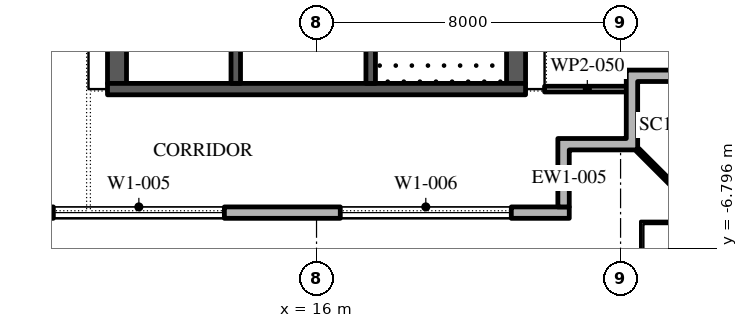
"""IFC4 building model, lengths in metres.
Left out: names, types, materials, properties, quantities, classifications, styles, units other than length and angle.
Written with IfcOpenShell. Run it as: python <this file> out.ifc"""

import sys

from ifc_helpers import new_model, si_unit, direction, frame, frame_2d, origin, place, context, subcontext, project, spatial, polyline, rectangle, outline, extrude, element, fill, save


model = new_model("IFC4")
c1 = context("Model", 3, precision=1e-05, world=origin(), true_north=direction((0.0, 1.0)))
c2 = subcontext(c1, "Body", "Model", "MODEL_VIEW")
j1 = project(units=[si_unit("LENGTHUNIT", "METRE"), si_unit("PLANEANGLEUNIT", "RADIAN")], contexts=[c1])
p1 = place(None, origin())
s1 = spatial("IfcSite", under=j1, at=p1, CompositionType="ELEMENT")
p2 = place(p1, origin())
s2 = spatial("IfcBuilding", under=s1, at=p2, CompositionType="ELEMENT")
p3 = place(p2, frame((0.0, 0.0, 334.2)))
s3 = spatial("IfcBuildingStorey", under=s2, at=p3, CompositionType="ELEMENT", Elevation=334.2)
p4 = place(p3, frame((-22.35, -5.85, 0.0), z_axis=(0.0, 0.0, 1.0), x_axis=(1.0, 0.0, 0.0)))
e1 = element("IfcWall", 1, at=p4, inside=s3, PredefinedType="STANDARD", context=c2, shape_type="SweptSolid", body=[
    extrude(rectangle(XDim=45.0, YDim=0.3, at=frame_2d((22.5, 0.0))), origin(), (0.0, 0.0, 1.0), 4.0),
])
p5 = place(p4, frame((1.375, 0.0, 0.45)))
e2 = element("IfcOpeningElement", 2, at=p5, cuts=e1, PredefinedType="OPENING", context=c2, shape_type="SweptSolid", body=[
    extrude(rectangle(XDim=4.5, YDim=3.05, at=frame_2d((2.25, 1.525))), frame((0.0, 0.16, 0.0), z_axis=(0.0, -1.0, 0.0), x_axis=(1.0, 0.0, 0.0)), (0.0, 0.0, 1.0), 0.32),
])
p6 = place(p4, frame((8.775, 0.0, 0.45)))
e3 = element("IfcOpeningElement", 3, at=p6, cuts=e1, PredefinedType="OPENING", context=c2, shape_type="SweptSolid", body=[
    extrude(rectangle(XDim=4.5, YDim=3.05, at=frame_2d((2.25, 1.525))), frame((0.0, 0.16, 0.0), z_axis=(0.0, -1.0, 0.0), x_axis=(1.0, 0.0, 0.0)), (0.0, 0.0, 1.0), 0.32),
])
p7 = place(p4, frame((17.375, 0.0, 0.0)))
e4 = element("IfcOpeningElement", 4, at=p7, cuts=e1, PredefinedType="OPENING", context=c2, shape_type="SweptSolid", body=[
    extrude(rectangle(XDim=2.4, YDim=3.5, at=frame_2d((1.2, 1.75))), frame((0.0, 0.16, 0.0), z_axis=(0.0, -1.0, 0.0), x_axis=(1.0, 0.0, 0.0)), (0.0, 0.0, 1.0), 0.32),
])
p8 = place(p4, frame((23.875, 0.0, 0.45)))
e5 = element("IfcOpeningElement", 5, at=p8, cuts=e1, PredefinedType="OPENING", context=c2, shape_type="SweptSolid", body=[
    extrude(rectangle(XDim=4.5, YDim=3.05, at=frame_2d((2.25, 1.525))), frame((0.0, 0.16, 0.0), z_axis=(0.0, -1.0, 0.0), x_axis=(1.0, 0.0, 0.0)), (0.0, 0.0, 1.0), 0.32),
])
p9 = place(p4, frame((31.425, 0.0, 0.45)))
e6 = element("IfcOpeningElement", 6, at=p9, cuts=e1, PredefinedType="OPENING", context=c2, shape_type="SweptSolid", body=[
    extrude(rectangle(XDim=4.5, YDim=3.05, at=frame_2d((2.25, 1.525))), frame((0.0, 0.16, 0.0), z_axis=(0.0, -1.0, 0.0), x_axis=(1.0, 0.0, 0.0)), (0.0, 0.0, 1.0), 0.32),
])
p10 = place(p4, frame((38.975, 0.0, 0.45)))
e7 = element("IfcOpeningElement", 7, at=p10, cuts=e1, PredefinedType="OPENING", context=c2, shape_type="SweptSolid", body=[
    extrude(rectangle(XDim=4.5, YDim=3.05, at=frame_2d((2.25, 1.525))), frame((0.0, 0.16, 0.0), z_axis=(0.0, -1.0, 0.0), x_axis=(1.0, 0.0, 0.0)), (0.0, 0.0, 1.0), 0.32),
])
p11 = place(p3, origin())
e8 = element("IfcWall", 8, at=p11, inside=s3, PredefinedType="STANDARD", context=c2, shape_type="SweptSolid", body=[
    extrude(outline(polyline([(24.15, -3.9), (24.15, -2.1), (26.25, -2.1), (26.25, -2.4), (24.45, -2.4), (24.45, -4.2), (22.65, -4.2), (22.65, -5.7), (22.35, -5.7), (22.35, -3.9), (24.15, -3.9)])), origin(), (0.0, 0.0, 1.0), 4.0),
])
p12 = place(p3, frame((24.45, -4.2, -0.05), z_axis=(0.0, 0.0, 1.0), x_axis=(0.707106781187, -0.707106781187, 0.0)))
e9 = element("IfcWall", 9, at=p12, inside=s3, PredefinedType="STANDARD", context=c2, shape_type="SweptSolid", body=[
    extrude(rectangle(XDim=2.667, YDim=0.1, at=frame_2d((1.333, 0.0))), origin(), (0.0, 0.0, 1.0), 4.05),
])
p13 = place(p3, frame((21.25, -2.45, 0.0), z_axis=(0.0, 0.0, 1.0), x_axis=(0.0, 1.0, 0.0)))
e10 = element("IfcWall", 10, at=p13, inside=s3, PredefinedType="SHEAR", context=c2, shape_type="SweptSolid", body=[
    extrude(rectangle(XDim=27.9, YDim=0.5, at=frame_2d((13.95, 0.0))), origin(), (0.0, 0.0, 1.0), 4.0),
])
p14 = place(p13, frame((5.05, 0.0, 0.0)))
e11 = element("IfcOpeningElement", 11, at=p14, cuts=e10, PredefinedType="OPENING", context=c2, shape_type="SweptSolid", body=[
    extrude(rectangle(XDim=1.2, YDim=2.1, at=frame_2d((0.6, 1.05))), frame((0.0, 0.26, 0.0), z_axis=(0.0, -1.0, 0.0), x_axis=(1.0, 0.0, 0.0)), (0.0, 0.0, 1.0), 0.52),
])
p15 = place(p13, frame((21.65, 0.0, 0.0)))
e12 = element("IfcOpeningElement", 12, at=p15, cuts=e10, PredefinedType="OPENING", context=c2, shape_type="SweptSolid", body=[
    extrude(rectangle(XDim=1.2, YDim=2.1, at=frame_2d((0.6, 1.05))), frame((0.0, 0.26, 0.0), z_axis=(0.0, -1.0, 0.0), x_axis=(1.0, 0.0, 0.0)), (0.0, 0.0, 1.0), 0.52),
])
p16 = place(p3, frame((10.75, -2.45, 0.0), z_axis=(0.0, 0.0, 1.0), x_axis=(0.0, 1.0, 0.0)))
e13 = element("IfcWall", 13, at=p16, inside=s3, PredefinedType="SHEAR", context=c2, shape_type="SweptSolid", body=[
    extrude(rectangle(XDim=27.9, YDim=0.5, at=frame_2d((13.95, 0.0))), origin(), (0.0, 0.0, 1.0), 4.0),
])
p17 = place(p16, frame((23.65, 0.0, 0.0)))
e14 = element("IfcOpeningElement", 14, at=p17, cuts=e13, PredefinedType="OPENING", context=c2, shape_type="SweptSolid", body=[
    extrude(rectangle(XDim=2.4, YDim=2.1, at=frame_2d((1.2, 1.05))), frame((0.0, 0.26, 0.0), z_axis=(0.0, -1.0, 0.0), x_axis=(1.0, 0.0, 0.0)), (0.0, 0.0, 1.0), 0.52),
])
p18 = place(p16, frame((1.387, 0.0, 0.0)))
e15 = element("IfcOpeningElement", 15, at=p18, cuts=e13, PredefinedType="OPENING", context=c2, shape_type="SweptSolid", body=[
    extrude(rectangle(XDim=0.9, YDim=2.1, at=frame_2d((0.45, 1.05))), frame((0.0, 0.26, 0.0), z_axis=(0.0, -1.0, 0.0), x_axis=(1.0, 0.0, 0.0)), (0.0, 0.0, 1.0), 0.52),
])
p19 = place(p16, frame((4.562, 0.0, 0.0)))
e16 = element("IfcOpeningElement", 16, at=p19, cuts=e13, PredefinedType="OPENING", context=c2, shape_type="SweptSolid", body=[
    extrude(rectangle(XDim=1.0, YDim=2.1, at=frame_2d((0.5, 1.05))), frame((0.0, 0.26, 0.0), z_axis=(0.0, -1.0, 0.0), x_axis=(1.0, 0.0, 0.0)), (0.0, 0.0, 1.0), 0.52),
])
p20 = place(p3, frame((10.5, -2.6, 0.0), z_axis=(0.0, 0.0, 1.0), x_axis=(1.0, 0.0, 0.0)))
e17 = element("IfcWall", 17, at=p20, inside=s3, PredefinedType="SHEAR", context=c2, shape_type="SweptSolid", body=[
    extrude(rectangle(XDim=11.0, YDim=0.3, at=frame_2d((5.5, 0.0))), origin(), (0.0, 0.0, 1.0), 4.0),
])
p21 = place(p3, frame((17.425, -2.45, 0.0), z_axis=(0.0, 0.0, 1.0), x_axis=(0.0, 1.0, 0.0)))
e18 = element("IfcWall", 18, at=p21, inside=s3, PredefinedType="SHEAR", context=c2, shape_type="SweptSolid", body=[
    extrude(rectangle(XDim=6.3, YDim=0.25, at=frame_2d((3.15, 0.0))), origin(), (0.0, 0.0, 1.0), 4.0),
])
p22 = place(p21, frame((5.05, 0.0, 0.0)))
e19 = element("IfcOpeningElement", 19, at=p22, cuts=e18, PredefinedType="OPENING", context=c2, shape_type="SweptSolid", body=[
    extrude(rectangle(XDim=1.2, YDim=2.1, at=frame_2d((0.6, 1.05))), frame((0.0, 0.135, 0.0), z_axis=(0.0, -1.0, 0.0), x_axis=(1.0, 0.0, 0.0)), (0.0, 0.0, 1.0), 0.27),
])
p23 = place(p3, frame((13.875, -2.45, 0.0), z_axis=(0.0, 0.0, 1.0), x_axis=(0.0, 1.0, 0.0)))
e20 = element("IfcWall", 20, at=p23, inside=s3, PredefinedType="SHEAR", context=c2, shape_type="SweptSolid", body=[
    extrude(rectangle(XDim=21.3, YDim=0.25, at=frame_2d((10.65, 0.0))), origin(), (0.0, 0.0, 1.0), 4.0),
])
p24 = place(p23, frame((9.846, 0.0, 0.0)))
e21 = element("IfcOpeningElement", 21, at=p24, cuts=e20, PredefinedType="OPENING", context=c2, shape_type="SweptSolid", body=[
    extrude(rectangle(XDim=0.9, YDim=2.1, at=frame_2d((0.45, 1.05))), frame((0.0, 0.135, 0.0), z_axis=(0.0, -1.0, 0.0), x_axis=(1.0, 0.0, 0.0)), (0.0, 0.0, 1.0), 0.27),
])
p25 = place(p23, frame((12.911, 0.0, 0.0)))
e22 = element("IfcOpeningElement", 22, at=p25, cuts=e20, PredefinedType="OPENING", context=c2, shape_type="SweptSolid", body=[
    extrude(rectangle(XDim=0.9, YDim=2.1, at=frame_2d((0.45, 1.05))), frame((0.0, 0.135, 0.0), z_axis=(0.0, -1.0, 0.0), x_axis=(1.0, 0.0, 0.0)), (0.0, 0.0, 1.0), 0.27),
])
p26 = place(p23, frame((6.971, 0.0, 0.0)))
e23 = element("IfcOpeningElement", 23, at=p26, cuts=e20, PredefinedType="OPENING", context=c2, shape_type="SweptSolid", body=[
    extrude(rectangle(XDim=1.1, YDim=2.1, at=frame_2d((0.55, 1.05))), frame((0.0, 0.135, 0.0), z_axis=(0.0, -1.0, 0.0), x_axis=(1.0, 0.0, 0.0)), (0.0, 0.0, 1.0), 0.27),
])
p27 = place(p23, frame((15.543, 0.0, 0.0)))
e24 = element("IfcOpeningElement", 24, at=p27, cuts=e20, PredefinedType="OPENING", context=c2, shape_type="SweptSolid", body=[
    extrude(rectangle(XDim=1.1, YDim=2.1, at=frame_2d((0.55, 1.05))), frame((0.0, 0.135, 0.0), z_axis=(0.0, -1.0, 0.0), x_axis=(1.0, 0.0, 0.0)), (0.0, 0.0, 1.0), 0.27),
])
p28 = place(p23, frame((17.686, 0.0, 0.0)))
e25 = element("IfcOpeningElement", 25, at=p28, cuts=e20, PredefinedType="OPENING", context=c2, shape_type="SweptSolid", body=[
    extrude(rectangle(XDim=1.1, YDim=2.1, at=frame_2d((0.55, 1.05))), frame((0.0, 0.135, 0.0), z_axis=(0.0, -1.0, 0.0), x_axis=(1.0, 0.0, 0.0)), (0.0, 0.0, 1.0), 0.27),
])
p29 = place(p23, frame((19.829, 0.0, 0.0)))
e26 = element("IfcOpeningElement", 26, at=p29, cuts=e20, PredefinedType="OPENING", context=c2, shape_type="SweptSolid", body=[
    extrude(rectangle(XDim=1.1, YDim=2.1, at=frame_2d((0.55, 1.05))), frame((0.0, 0.135, 0.0), z_axis=(0.0, -1.0, 0.0), x_axis=(1.0, 0.0, 0.0)), (0.0, 0.0, 1.0), 0.27),
])
p30 = place(p3, frame((22.0, -2.6, 0.0), z_axis=(0.0, 0.0, 1.0), x_axis=(1.0, 0.0, 0.0)))
e27 = element("IfcWall", 27, at=p30, inside=s3, PredefinedType="PARTITIONING", context=c2, shape_type="SweptSolid", body=[
    extrude(rectangle(XDim=2.25, YDim=0.15, at=frame_2d((1.125, 0.0))), origin(), (0.0, 0.0, 1.0), 4.0),
])
p31 = place(p9, origin())
e28 = element("IfcWindow", 28, at=p31, inside=s3, PartitioningType="DOUBLE_PANEL_VERTICAL", PredefinedType="WINDOW", context=c2, shape_type="SweptSolid", body=[
    extrude(rectangle(XDim=4.5, YDim=3.05, at=frame_2d((2.25, 1.525))), frame((0.0, 0.03, 0.0), z_axis=(0.0, -1.0, 0.0), x_axis=(1.0, 0.0, 0.0)), (0.0, 0.0, 1.0), 0.06),
])
fill(e6, e28)
p32 = place(p10, origin())
e29 = element("IfcWindow", 29, at=p32, inside=s3, PartitioningType="DOUBLE_PANEL_VERTICAL", PredefinedType="WINDOW", context=c2, shape_type="SweptSolid", body=[
    extrude(rectangle(XDim=4.5, YDim=3.05, at=frame_2d((2.25, 1.525))), frame((0.0, 0.03, 0.0), z_axis=(0.0, -1.0, 0.0), x_axis=(1.0, 0.0, 0.0)), (0.0, 0.0, 1.0), 0.06),
])
fill(e7, e29)
save(model, sys.argv[1])
